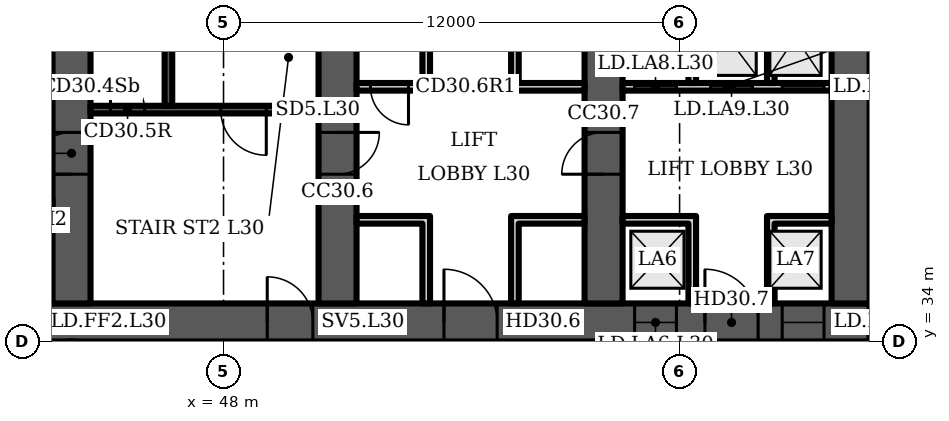
"""IFC4 building model, lengths in metres.
Left out: names, types, materials, properties, quantities, classifications, styles, units other than length and angle.
Written with IfcOpenShell. Run it as: python <this file> out.ifc"""

import sys

from ifc_helpers import new_model, si_unit, direction, frame, frame_2d, origin, place, context, subcontext, project, spatial, polyline, rectangle, outline, extrude, element, fill, save


model = new_model("IFC4")
c1 = context("Model", 3, precision=1e-05, world=origin(), true_north=direction((0.0, 1.0)))
c2 = subcontext(c1, "Body", "Model", "MODEL_VIEW")
j1 = project(units=[si_unit("LENGTHUNIT", "METRE"), si_unit("PLANEANGLEUNIT", "RADIAN")], contexts=[c1])
p1 = place(None, origin())
s1 = spatial("IfcSite", under=j1, at=p1, CompositionType="ELEMENT")
p2 = place(p1, origin())
s2 = spatial("IfcBuilding", under=s1, at=p2, CompositionType="ELEMENT")
p3 = place(p2, frame((0.0, 0.0, 129.1)))
s3 = spatial("IfcBuildingStorey", under=s2, at=p3, CompositionType="ELEMENT", Elevation=129.1)
p4 = place(p3, frame((16.0, 34.5, 0.0), z_axis=(0.0, 0.0, 1.0), x_axis=(1.0, 0.0, 0.0)))
e1 = element("IfcWall", 1, at=p4, inside=s3, PredefinedType="SHEAR", context=c2, shape_type="SweptSolid", body=[
    extrude(rectangle(XDim=49.0, YDim=1.0, at=frame_2d((24.5, 0.0))), origin(), (0.0, 0.0, 1.0), 3.6),
])
p5 = place(p4, frame((1.2, 0.0, 0.0)))
e2 = element("IfcOpeningElement", 2, at=p5, cuts=e1, PredefinedType="OPENING", context=c2, shape_type="SweptSolid", body=[
    extrude(rectangle(XDim=1.1, YDim=2.1, at=frame_2d((0.55, 1.05))), frame((0.0, 0.51, 0.0), z_axis=(0.0, -1.0, 0.0), x_axis=(1.0, 0.0, 0.0)), (0.0, 0.0, 1.0), 1.02),
])
p6 = place(p4, frame((5.083, 0.0, 0.0)))
e3 = element("IfcOpeningElement", 3, at=p6, cuts=e1, PredefinedType="OPENING", context=c2, shape_type="SweptSolid", body=[
    extrude(rectangle(XDim=1.1, YDim=2.1, at=frame_2d((0.55, 1.05))), frame((0.0, 0.51, 0.0), z_axis=(0.0, -1.0, 0.0), x_axis=(1.0, 0.0, 0.0)), (0.0, 0.0, 1.0), 1.02),
])
p7 = place(p4, frame((2.933, 0.0, 0.0)))
e4 = element("IfcOpeningElement", 4, at=p7, cuts=e1, PredefinedType="OPENING", context=c2, shape_type="SweptSolid", body=[
    extrude(rectangle(XDim=1.4, YDim=2.1, at=frame_2d((0.7, 1.05))), frame((0.0, 0.51, 0.0), z_axis=(0.0, -1.0, 0.0), x_axis=(1.0, 0.0, 0.0)), (0.0, 0.0, 1.0), 1.02),
])
p8 = place(p4, frame((7.65, 0.0, 0.0)))
e5 = element("IfcOpeningElement", 5, at=p8, cuts=e1, PredefinedType="OPENING", context=c2, shape_type="SweptSolid", body=[
    extrude(rectangle(XDim=1.2, YDim=2.1, at=frame_2d((0.6, 1.05))), frame((0.0, 0.51, 0.0), z_axis=(0.0, -1.0, 0.0), x_axis=(1.0, 0.0, 0.0)), (0.0, 0.0, 1.0), 1.02),
])
p9 = place(p4, frame((14.817, 0.0, 0.0)))
e6 = element("IfcOpeningElement", 6, at=p9, cuts=e1, PredefinedType="OPENING", context=c2, shape_type="SweptSolid", body=[
    extrude(rectangle(XDim=1.1, YDim=2.1, at=frame_2d((0.55, 1.05))), frame((0.0, 0.51, 0.0), z_axis=(0.0, -1.0, 0.0), x_axis=(1.0, 0.0, 0.0)), (0.0, 0.0, 1.0), 1.02),
])
p10 = place(p4, frame((19.083, 0.0, 0.0)))
e7 = element("IfcOpeningElement", 7, at=p10, cuts=e1, PredefinedType="OPENING", context=c2, shape_type="SweptSolid", body=[
    extrude(rectangle(XDim=1.1, YDim=2.1, at=frame_2d((0.55, 1.05))), frame((0.0, 0.51, 0.0), z_axis=(0.0, -1.0, 0.0), x_axis=(1.0, 0.0, 0.0)), (0.0, 0.0, 1.0), 1.02),
])
p11 = place(p4, frame((16.8, 0.0, 0.0)))
e8 = element("IfcOpeningElement", 8, at=p11, cuts=e1, PredefinedType="OPENING", context=c2, shape_type="SweptSolid", body=[
    extrude(rectangle(XDim=1.4, YDim=2.1, at=frame_2d((0.7, 1.05))), frame((0.0, 0.51, 0.0), z_axis=(0.0, -1.0, 0.0), x_axis=(1.0, 0.0, 0.0)), (0.0, 0.0, 1.0), 1.02),
])
p12 = place(p4, frame((21.817, 0.0, 0.0)))
e9 = element("IfcOpeningElement", 9, at=p12, cuts=e1, PredefinedType="OPENING", context=c2, shape_type="SweptSolid", body=[
    extrude(rectangle(XDim=1.1, YDim=2.1, at=frame_2d((0.55, 1.05))), frame((0.0, 0.51, 0.0), z_axis=(0.0, -1.0, 0.0), x_axis=(1.0, 0.0, 0.0)), (0.0, 0.0, 1.0), 1.02),
])
p13 = place(p4, frame((26.083, 0.0, 0.0)))
e10 = element("IfcOpeningElement", 10, at=p13, cuts=e1, PredefinedType="OPENING", context=c2, shape_type="SweptSolid", body=[
    extrude(rectangle(XDim=1.1, YDim=2.1, at=frame_2d((0.55, 1.05))), frame((0.0, 0.51, 0.0), z_axis=(0.0, -1.0, 0.0), x_axis=(1.0, 0.0, 0.0)), (0.0, 0.0, 1.0), 1.02),
])
p14 = place(p4, frame((33.15, 0.0, 0.0)))
e11 = element("IfcOpeningElement", 11, at=p14, cuts=e1, PredefinedType="OPENING", context=c2, shape_type="SweptSolid", body=[
    extrude(rectangle(XDim=1.2, YDim=2.1, at=frame_2d((0.6, 1.05))), frame((0.0, 0.51, 0.0), z_axis=(0.0, -1.0, 0.0), x_axis=(1.0, 0.0, 0.0)), (0.0, 0.0, 1.0), 1.02),
])
p15 = place(p4, frame((37.8, 0.0, 0.0)))
e12 = element("IfcOpeningElement", 12, at=p15, cuts=e1, PredefinedType="OPENING", context=c2, shape_type="SweptSolid", body=[
    extrude(rectangle(XDim=1.4, YDim=2.1, at=frame_2d((0.7, 1.05))), frame((0.0, 0.51, 0.0), z_axis=(0.0, -1.0, 0.0), x_axis=(1.0, 0.0, 0.0)), (0.0, 0.0, 1.0), 1.02),
])
p16 = place(p4, frame((42.817, 0.0, 0.0)))
e13 = element("IfcOpeningElement", 13, at=p16, cuts=e1, PredefinedType="OPENING", context=c2, shape_type="SweptSolid", body=[
    extrude(rectangle(XDim=1.1, YDim=2.1, at=frame_2d((0.55, 1.05))), frame((0.0, 0.51, 0.0), z_axis=(0.0, -1.0, 0.0), x_axis=(1.0, 0.0, 0.0)), (0.0, 0.0, 1.0), 1.02),
])
p17 = place(p4, frame((46.7, 0.0, 0.0)))
e14 = element("IfcOpeningElement", 14, at=p17, cuts=e1, PredefinedType="OPENING", context=c2, shape_type="SweptSolid", body=[
    extrude(rectangle(XDim=1.1, YDim=2.1, at=frame_2d((0.55, 1.05))), frame((0.0, 0.51, 0.0), z_axis=(0.0, -1.0, 0.0), x_axis=(1.0, 0.0, 0.0)), (0.0, 0.0, 1.0), 1.02),
])
p18 = place(p4, frame((44.667, 0.0, 0.0)))
e15 = element("IfcOpeningElement", 15, at=p18, cuts=e1, PredefinedType="OPENING", context=c2, shape_type="SweptSolid", body=[
    extrude(rectangle(XDim=1.4, YDim=2.1, at=frame_2d((0.7, 1.05))), frame((0.0, 0.51, 0.0), z_axis=(0.0, -1.0, 0.0), x_axis=(1.0, 0.0, 0.0)), (0.0, 0.0, 1.0), 1.02),
])
p19 = place(p3, frame((44.0, 35.0, 0.0), z_axis=(0.0, 0.0, 1.0), x_axis=(0.0, 1.0, 0.0)))
e16 = element("IfcWall", 16, at=p19, inside=s3, PredefinedType="SHEAR", context=c2, shape_type="SweptSolid", body=[
    extrude(rectangle(XDim=14.577, YDim=1.0, at=frame_2d((7.289, 0.0))), origin(), (0.0, 0.0, 1.0), 3.6),
])
p20 = place(p19, frame((3.4, 0.0, 0.0)))
e17 = element("IfcOpeningElement", 17, at=p20, cuts=e16, PredefinedType="OPENING", context=c2, shape_type="SweptSolid", body=[
    extrude(rectangle(XDim=1.1, YDim=2.1, at=frame_2d((0.55, 1.05))), frame((0.0, 0.51, 0.0), z_axis=(0.0, -1.0, 0.0), x_axis=(1.0, 0.0, 0.0)), (0.0, 0.0, 1.0), 1.02),
])
p21 = place(p19, frame((9.8, 0.0, 0.0)))
e18 = element("IfcOpeningElement", 18, at=p21, cuts=e16, PredefinedType="OPENING", context=c2, shape_type="SweptSolid", body=[
    extrude(rectangle(XDim=1.0, YDim=2.1, at=frame_2d((0.5, 1.05))), frame((0.0, 0.51, 0.0), z_axis=(0.0, -1.0, 0.0), x_axis=(1.0, 0.0, 0.0)), (0.0, 0.0, 1.0), 1.02),
])
p22 = place(p3, frame((51.0, 35.0, 0.0), z_axis=(0.0, 0.0, 1.0), x_axis=(0.0, 1.0, 0.0)))
e19 = element("IfcWall", 19, at=p22, inside=s3, PredefinedType="SHEAR", context=c2, shape_type="SweptSolid", body=[
    extrude(rectangle(XDim=13.965, YDim=1.0, at=frame_2d((6.982, 0.0))), origin(), (0.0, 0.0, 1.0), 3.6),
])
p23 = place(p22, frame((3.4, 0.0, 0.0)))
e20 = element("IfcOpeningElement", 20, at=p23, cuts=e19, PredefinedType="OPENING", context=c2, shape_type="SweptSolid", body=[
    extrude(rectangle(XDim=1.1, YDim=2.1, at=frame_2d((0.55, 1.05))), frame((0.0, 0.51, 0.0), z_axis=(0.0, -1.0, 0.0), x_axis=(1.0, 0.0, 0.0)), (0.0, 0.0, 1.0), 1.02),
])
p24 = place(p3, frame((58.0, 35.0, 0.0), z_axis=(0.0, 0.0, 1.0), x_axis=(0.0, 1.0, 0.0)))
e21 = element("IfcWall", 21, at=p24, inside=s3, PredefinedType="SHEAR", context=c2, shape_type="SweptSolid", body=[
    extrude(rectangle(XDim=13.352, YDim=1.0, at=frame_2d((6.676, 0.0))), origin(), (0.0, 0.0, 1.0), 3.6),
])
p25 = place(p24, frame((10.426, 0.0, 0.0)))
e22 = element("IfcOpeningElement", 22, at=p25, cuts=e21, PredefinedType="OPENING", context=c2, shape_type="SweptSolid", body=[
    extrude(rectangle(XDim=1.0, YDim=2.1, at=frame_2d((0.5, 1.05))), frame((0.0, 0.51, 0.0), z_axis=(0.0, -1.0, 0.0), x_axis=(1.0, 0.0, 0.0)), (0.0, 0.0, 1.0), 1.02),
])
p26 = place(p24, frame((3.4, 0.0, 0.0)))
e23 = element("IfcOpeningElement", 23, at=p26, cuts=e21, PredefinedType="OPENING", context=c2, shape_type="SweptSolid", body=[
    extrude(rectangle(XDim=1.1, YDim=2.1, at=frame_2d((0.55, 1.05))), frame((0.0, 0.51, 0.0), z_axis=(0.0, -1.0, 0.0), x_axis=(1.0, 0.0, 0.0)), (0.0, 0.0, 1.0), 1.02),
])
p27 = place(p3, frame((64.5, 35.0, 0.0), z_axis=(0.0, 0.0, 1.0), x_axis=(0.0, 1.0, 0.0)))
e24 = element("IfcWall", 24, at=p27, inside=s3, PredefinedType="SHEAR", context=c2, shape_type="SweptSolid", body=[
    extrude(rectangle(XDim=12.784, YDim=1.0, at=frame_2d((6.392, 0.0))), origin(), (0.0, 0.0, 1.0), 3.6),
])
p28 = place(p3, frame((44.5, 40.1, 0.0), z_axis=(0.0, 0.0, 1.0), x_axis=(1.0, 0.0, 0.0)))
e25 = element("IfcWall", 25, at=p28, inside=s3, PredefinedType="SHEAR", context=c2, shape_type="SweptSolid", body=[
    extrude(rectangle(XDim=6.0, YDim=0.2, at=frame_2d((3.0, 0.0))), origin(), (0.0, 0.0, 1.0), 3.2),
])
p29 = place(p28, frame((3.425, 0.0, 0.0)))
e26 = element("IfcOpeningElement", 26, at=p29, cuts=e25, PredefinedType="OPENING", context=c2, shape_type="SweptSolid", body=[
    extrude(rectangle(XDim=1.2, YDim=2.1, at=frame_2d((0.6, 1.05))), frame((0.0, 0.11, 0.0), z_axis=(0.0, -1.0, 0.0), x_axis=(1.0, 0.0, 0.0)), (0.0, 0.0, 1.0), 0.22),
])
p30 = place(p28, frame((0.525, 0.0, 0.0)))
e27 = element("IfcOpeningElement", 27, at=p30, cuts=e25, PredefinedType="OPENING", context=c2, shape_type="SweptSolid", body=[
    extrude(rectangle(XDim=0.9, YDim=2.1, at=frame_2d((0.45, 1.05))), frame((0.0, 0.11, 0.0), z_axis=(0.0, -1.0, 0.0), x_axis=(1.0, 0.0, 0.0)), (0.0, 0.0, 1.0), 0.22),
])
p31 = place(p3, frame((46.55, 40.2, 0.0), z_axis=(0.0, 0.0, 1.0), x_axis=(0.0, 1.0, 0.0)))
e28 = element("IfcWall", 28, at=p31, inside=s3, PredefinedType="SHEAR", context=c2, shape_type="SweptSolid", body=[
    extrude(rectangle(XDim=7.2, YDim=0.2, at=frame_2d((3.6, 0.0))), origin(), (0.0, 0.0, 1.0), 3.2),
])
p32 = place(p3, frame((51.5, 40.7, 0.0), z_axis=(0.0, 0.0, 1.0), x_axis=(1.0, 0.0, 0.0)))
e29 = element("IfcWall", 29, at=p32, inside=s3, PredefinedType="PARTITIONING", context=c2, shape_type="SweptSolid", body=[
    extrude(rectangle(XDim=6.0, YDim=0.2, at=frame_2d((3.0, 0.0))), origin(), (0.0, 0.0, 1.0), 3.2),
])
p33 = place(p32, frame((0.367, 0.0, 0.0)))
e30 = element("IfcOpeningElement", 30, at=p33, cuts=e29, PredefinedType="OPENING", context=c2, shape_type="SweptSolid", body=[
    extrude(rectangle(XDim=1.0, YDim=2.1, at=frame_2d((0.5, 1.05))), frame((0.0, 0.11, 0.0), z_axis=(0.0, -1.0, 0.0), x_axis=(1.0, 0.0, 0.0)), (0.0, 0.0, 1.0), 0.22),
])
p34 = place(p3, frame((0.0, 0.0, -0.0)))
e31 = element("IfcWall", 31, at=p34, inside=s3, PredefinedType="PARTITIONING", context=c2, shape_type="SweptSolid", body=[
    extrude(outline(polyline([(53.233, 37.1), (51.5, 37.1), (51.5, 37.3), (53.233, 37.3), (53.433, 37.3), (53.433, 35.0), (53.233, 35.0), (53.233, 37.1)])), origin(), (0.0, 0.0, 1.0), 3.2),
])
p35 = place(p3, frame((0.0, 0.0, -0.0)))
e32 = element("IfcWall", 32, at=p35, inside=s3, PredefinedType="PARTITIONING", context=c2, shape_type="SweptSolid", body=[
    extrude(outline(polyline([(55.567, 37.3), (55.767, 37.3), (57.5, 37.3), (57.5, 37.1), (55.767, 37.1), (55.767, 35.0), (55.567, 35.0), (55.567, 37.3)])), origin(), (0.0, 0.0, 1.0), 3.2),
])
p36 = place(p3, frame((0.0, 0.0, -0.0)))
e33 = element("IfcWall", 33, at=p36, inside=s3, PredefinedType="PARTITIONING", context=c2, shape_type="SweptSolid", body=[
    extrude(outline(polyline([(53.233, 40.8), (53.233, 43.8), (53.433, 43.8), (53.433, 40.8), (53.233, 40.8)])), origin(), (0.0, 0.0, 1.0), 3.2),
])
p37 = place(p3, frame((0.0, 0.0, -0.0)))
e34 = element("IfcWall", 34, at=p37, inside=s3, PredefinedType="PARTITIONING", context=c2, shape_type="SweptSolid", body=[
    extrude(outline(polyline([(55.567, 40.8), (55.567, 43.8), (55.767, 43.8), (55.767, 40.8), (55.567, 40.8)])), origin(), (0.0, 0.0, 1.0), 3.2),
])
p38 = place(p3, frame((58.5, 40.7, 0.0), z_axis=(0.0, 0.0, 1.0), x_axis=(1.0, 0.0, 0.0)))
e35 = element("IfcWall", 35, at=p38, inside=s3, PredefinedType="PARTITIONING", context=c2, shape_type="SweptSolid", body=[
    extrude(rectangle(XDim=5.5, YDim=0.2, at=frame_2d((2.75, 0.0))), origin(), (0.0, 0.0, 1.0), 3.2),
])
p39 = place(p38, frame((0.317, 0.0, 0.0)))
e36 = element("IfcOpeningElement", 36, at=p39, cuts=e35, PredefinedType="OPENING", context=c2, shape_type="SweptSolid", body=[
    extrude(rectangle(XDim=1.1, YDim=2.1, at=frame_2d((0.55, 1.05))), frame((0.0, 0.11, 0.0), z_axis=(0.0, -1.0, 0.0), x_axis=(1.0, 0.0, 0.0)), (0.0, 0.0, 1.0), 0.22),
])
p40 = place(p38, frame((2.317, 0.0, 0.0)))
e37 = element("IfcOpeningElement", 37, at=p40, cuts=e35, PredefinedType="OPENING", context=c2, shape_type="SweptSolid", body=[
    extrude(rectangle(XDim=1.1, YDim=2.1, at=frame_2d((0.55, 1.05))), frame((0.0, 0.11, 0.0), z_axis=(0.0, -1.0, 0.0), x_axis=(1.0, 0.0, 0.0)), (0.0, 0.0, 1.0), 0.22),
])
p41 = place(p38, frame((4.2, 0.0, 0.0)))
e38 = element("IfcOpeningElement", 38, at=p41, cuts=e35, PredefinedType="OPENING", context=c2, shape_type="SweptSolid", body=[
    extrude(rectangle(XDim=1.1, YDim=2.1, at=frame_2d((0.55, 1.05))), frame((0.0, 0.11, 0.0), z_axis=(0.0, -1.0, 0.0), x_axis=(1.0, 0.0, 0.0)), (0.0, 0.0, 1.0), 0.22),
])
p42 = place(p3, frame((0.0, 0.0, -0.0)))
e39 = element("IfcWall", 39, at=p42, inside=s3, PredefinedType="PARTITIONING", context=c2, shape_type="SweptSolid", body=[
    extrude(outline(polyline([(60.233, 37.1), (58.5, 37.1), (58.5, 37.3), (60.233, 37.3), (60.433, 37.3), (60.433, 35.0), (60.233, 35.0), (60.233, 37.1)])), origin(), (0.0, 0.0, 1.0), 3.2),
])
p43 = place(p3, frame((0.0, 0.0, -0.0)))
e40 = element("IfcWall", 40, at=p43, inside=s3, PredefinedType="PARTITIONING", context=c2, shape_type="SweptSolid", body=[
    extrude(outline(polyline([(62.3, 37.3), (62.5, 37.3), (64.0, 37.3), (64.0, 37.1), (62.5, 37.1), (62.5, 35.0), (62.3, 35.0), (62.3, 37.3)])), origin(), (0.0, 0.0, 1.0), 3.2),
])
p44 = place(p3, frame((0.0, 0.0, -0.0)))
e41 = element("IfcWall", 41, at=p44, inside=s3, PredefinedType="PARTITIONING", context=c2, shape_type="SweptSolid", body=[
    extrude(outline(polyline([(60.433, 40.8), (60.233, 40.8), (60.233, 43.8), (58.5, 43.8), (58.5, 44.0), (64.0, 44.0), (64.0, 43.8), (62.5, 43.8), (62.5, 40.8), (62.3, 40.8), (62.3, 43.8), (60.433, 43.8), (60.433, 40.8)])), origin(), (0.0, 0.0, 1.0), 3.2),
])
p45 = place(p29, origin())
e42 = element("IfcDoor", 42, at=p45, inside=s3, OperationType="SINGLE_SWING_RIGHT", PredefinedType="DOOR", context=c2, shape_type="SweptSolid", body=[
    extrude(rectangle(XDim=1.2, YDim=2.1, at=frame_2d((0.6, 1.05))), frame((0.0, 0.025, 0.0), z_axis=(0.0, -1.0, 0.0), x_axis=(1.0, 0.0, 0.0)), (0.0, 0.0, 1.0), 0.05),
])
fill(e26, e42)
p46 = place(p30, origin())
e43 = element("IfcDoor", 43, at=p46, inside=s3, OperationType="SINGLE_SWING_LEFT", PredefinedType="DOOR", context=c2, shape_type="SweptSolid", body=[
    extrude(rectangle(XDim=0.9, YDim=2.1, at=frame_2d((0.45, 1.05))), frame((0.0, 0.025, 0.0), z_axis=(0.0, -1.0, 0.0), x_axis=(1.0, 0.0, 0.0)), (0.0, 0.0, 1.0), 0.05),
])
fill(e27, e43)
p47 = place(p14, origin())
e44 = element("IfcDoor", 44, at=p47, inside=s3, OperationType="SINGLE_SWING_LEFT", PredefinedType="DOOR", context=c2, shape_type="SweptSolid", body=[
    extrude(rectangle(XDim=1.2, YDim=2.1, at=frame_2d((0.6, 1.05))), frame((0.0, 0.025, 0.0), z_axis=(0.0, -1.0, 0.0), x_axis=(1.0, 0.0, 0.0)), (0.0, 0.0, 1.0), 0.05),
])
fill(e11, e44)
p48 = place(p15, origin())
e45 = element("IfcDoor", 45, at=p48, inside=s3, OperationType="DOUBLE_DOOR_SINGLE_SWING", PredefinedType="DOOR", context=c2, shape_type="SweptSolid", body=[
    extrude(rectangle(XDim=1.4, YDim=2.1, at=frame_2d((0.7, 1.05))), frame((0.0, 0.025, 0.0), z_axis=(0.0, -1.0, 0.0), x_axis=(1.0, 0.0, 0.0)), (0.0, 0.0, 1.0), 0.05),
])
fill(e12, e45)
p49 = place(p33, origin())
e46 = element("IfcDoor", 46, at=p49, inside=s3, OperationType="SINGLE_SWING_RIGHT", PredefinedType="DOOR", context=c2, shape_type="SweptSolid", body=[
    extrude(rectangle(XDim=1.0, YDim=2.1, at=frame_2d((0.5, 1.05))), frame((0.0, 0.025, 0.0), z_axis=(0.0, -1.0, 0.0), x_axis=(1.0, 0.0, 0.0)), (0.0, 0.0, 1.0), 0.05),
])
fill(e30, e46)
p50 = place(p16, origin())
e47 = element("IfcDoor", 47, at=p50, inside=s3, OperationType="DOUBLE_DOOR_SLIDING", PredefinedType="DOOR", context=c2, shape_type="SweptSolid", body=[
    extrude(rectangle(XDim=1.1, YDim=2.1, at=frame_2d((0.55, 1.05))), frame((0.0, 0.025, 0.0), z_axis=(0.0, -1.0, 0.0), x_axis=(1.0, 0.0, 0.0)), (0.0, 0.0, 1.0), 0.05),
])
fill(e13, e47)
p51 = place(p17, origin())
e48 = element("IfcDoor", 48, at=p51, inside=s3, OperationType="DOUBLE_DOOR_SLIDING", PredefinedType="DOOR", context=c2, shape_type="SweptSolid", body=[
    extrude(rectangle(XDim=1.1, YDim=2.1, at=frame_2d((0.55, 1.05))), frame((0.0, 0.025, 0.0), z_axis=(0.0, -1.0, 0.0), x_axis=(1.0, 0.0, 0.0)), (0.0, 0.0, 1.0), 0.05),
])
fill(e14, e48)
p52 = place(p18, origin())
e49 = element("IfcDoor", 49, at=p52, inside=s3, OperationType="DOUBLE_DOOR_SINGLE_SWING", PredefinedType="DOOR", context=c2, shape_type="SweptSolid", body=[
    extrude(rectangle(XDim=1.4, YDim=2.1, at=frame_2d((0.7, 1.05))), frame((0.0, 0.025, 0.0), z_axis=(0.0, -1.0, 0.0), x_axis=(1.0, 0.0, 0.0)), (0.0, 0.0, 1.0), 0.05),
])
fill(e15, e49)
p53 = place(p39, origin())
e50 = element("IfcDoor", 50, at=p53, inside=s3, OperationType="DOUBLE_DOOR_SLIDING", PredefinedType="DOOR", context=c2, shape_type="SweptSolid", body=[
    extrude(rectangle(XDim=1.1, YDim=2.1, at=frame_2d((0.55, 1.05))), frame((0.0, 0.025, 0.0), z_axis=(0.0, -1.0, 0.0), x_axis=(1.0, 0.0, 0.0)), (0.0, 0.0, 1.0), 0.05),
])
fill(e36, e50)
p54 = place(p40, origin())
e51 = element("IfcDoor", 51, at=p54, inside=s3, OperationType="DOUBLE_DOOR_SLIDING", PredefinedType="DOOR", context=c2, shape_type="SweptSolid", body=[
    extrude(rectangle(XDim=1.1, YDim=2.1, at=frame_2d((0.55, 1.05))), frame((0.0, 0.025, 0.0), z_axis=(0.0, -1.0, 0.0), x_axis=(1.0, 0.0, 0.0)), (0.0, 0.0, 1.0), 0.05),
])
fill(e37, e51)
p55 = place(p41, origin())
e52 = element("IfcDoor", 52, at=p55, inside=s3, OperationType="DOUBLE_DOOR_SLIDING", PredefinedType="DOOR", context=c2, shape_type="SweptSolid", body=[
    extrude(rectangle(XDim=1.1, YDim=2.1, at=frame_2d((0.55, 1.05))), frame((0.0, 0.025, 0.0), z_axis=(0.0, -1.0, 0.0), x_axis=(1.0, 0.0, 0.0)), (0.0, 0.0, 1.0), 0.05),
])
fill(e38, e52)
p56 = place(p20, origin())
e53 = element("IfcDoor", 53, at=p56, inside=s3, OperationType="SINGLE_SWING_LEFT", PredefinedType="DOOR", context=c2, shape_type="SweptSolid", body=[
    extrude(rectangle(XDim=1.1, YDim=2.1, at=frame_2d((0.55, 1.05))), frame((0.0, 0.025, 0.0), z_axis=(0.0, -1.0, 0.0), x_axis=(1.0, 0.0, 0.0)), (0.0, 0.0, 1.0), 0.05),
])
fill(e17, e53)
p57 = place(p23, origin())
e54 = element("IfcDoor", 54, at=p57, inside=s3, OperationType="SINGLE_SWING_RIGHT", PredefinedType="DOOR", context=c2, shape_type="SweptSolid", body=[
    extrude(rectangle(XDim=1.1, YDim=2.1, at=frame_2d((0.55, 1.05))), frame((0.0, 0.025, 0.0), z_axis=(0.0, -1.0, 0.0), x_axis=(1.0, 0.0, 0.0)), (0.0, 0.0, 1.0), 0.05),
])
fill(e20, e54)
p58 = place(p26, origin())
e55 = element("IfcDoor", 55, at=p58, inside=s3, OperationType="SINGLE_SWING_LEFT", PredefinedType="DOOR", context=c2, shape_type="SweptSolid", body=[
    extrude(rectangle(XDim=1.1, YDim=2.1, at=frame_2d((0.55, 1.05))), frame((0.0, 0.025, 0.0), z_axis=(0.0, -1.0, 0.0), x_axis=(1.0, 0.0, 0.0)), (0.0, 0.0, 1.0), 0.05),
])
fill(e23, e55)
save(model, sys.argv[1])
